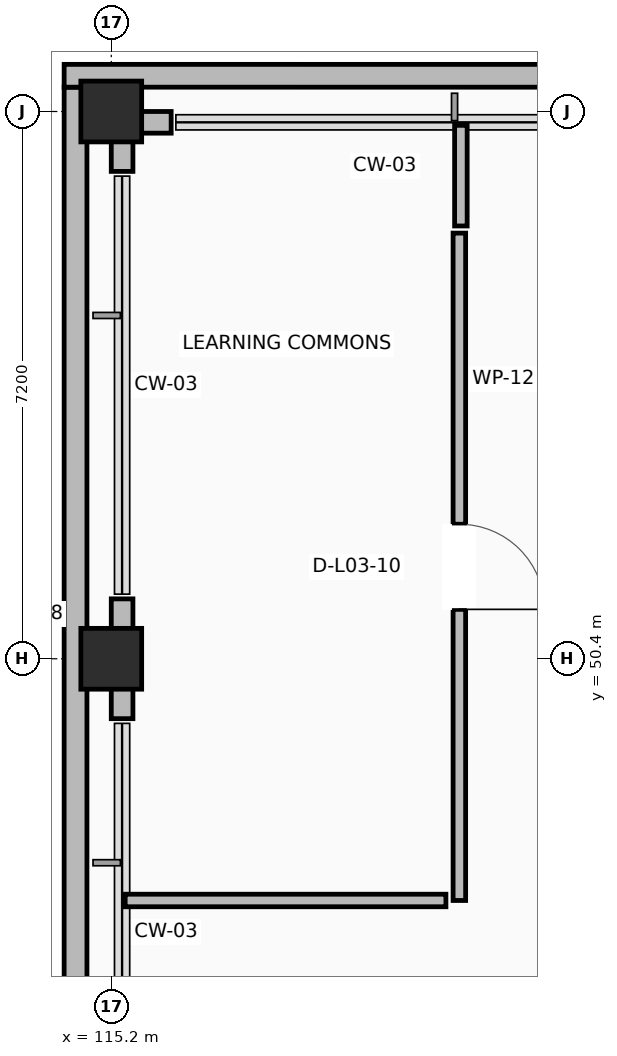
"""IFC4 building model, lengths in metres.
Left out: names, types, materials, properties, quantities, classifications, styles, units other than length and angle.
Written with IfcOpenShell. Run it as: python <this file> out.ifc"""

import sys

from ifc_helpers import new_model, si_unit, direction, frame, frame_2d, origin, origin_2d, place, context, subcontext, project, spatial, rectangle, extrude, element, fill, save


model = new_model("IFC4")
c1 = context("Model", 3, precision=1e-05, world=origin(), true_north=direction((0.0, 1.0)))
c2 = subcontext(c1, "Body", "Model", "MODEL_VIEW")
j1 = project(units=[si_unit("LENGTHUNIT", "METRE"), si_unit("PLANEANGLEUNIT", "RADIAN")], contexts=[c1])
p1 = place(None, origin())
s1 = spatial("IfcSite", under=j1, at=p1, CompositionType="ELEMENT")
p2 = place(p1, origin())
s2 = spatial("IfcBuilding", under=s1, at=p2, CompositionType="ELEMENT")
p3 = place(p2, frame((0.0, 0.0, 13.5)))
s3 = spatial("IfcBuildingStorey", under=s2, at=p3, CompositionType="ELEMENT", Elevation=13.5)
for number, where, z_axis, x_axis in (
    (1, (115.2, 50.4, 0.0), (0.0, 0.0, 1.0), (1.0, 0.0, 0.0)),
    (2, (115.2, 57.6, 0.0), (0.0, 0.0, 1.0), (1.0, 0.0, 0.0)),
):
    element("IfcColumn", number, at=place(p3, frame(where, z_axis=z_axis, x_axis=x_axis)), inside=s3, PredefinedType="COLUMN", context=c2, shape_type="SweptSolid", body=[
        extrude(rectangle(XDim=0.8, YDim=0.8, at=origin_2d()), origin(), (0.0, 0.0, 1.0), 4.22),
    ])
p4 = place(p3, frame((115.988, 57.458, 0.0), z_axis=(0.0, 0.0, 1.0), x_axis=(-1.0, 0.0, 0.0)))
e3 = element("IfcWall", 3, at=p4, inside=s3, PredefinedType="STANDARD", context=c2, shape_type="SweptSolid", body=[
    extrude(rectangle(XDim=0.788, YDim=0.285, at=frame_2d((0.394, 0.0))), origin(), (0.0, 0.0, 1.0), 3.26),
])
p5 = place(p3, frame((115.343, 57.315, 0.0), z_axis=(0.0, 0.0, 1.0), x_axis=(0.0, -1.0, 0.0)))
e4 = element("IfcWall", 4, at=p5, inside=s3, PredefinedType="STANDARD", context=c2, shape_type="SweptSolid", body=[
    extrude(rectangle(XDim=0.503, YDim=0.285, at=frame_2d((0.251, 0.0))), origin(), (0.0, 0.0, 1.0), 3.26),
])
p6 = place(p3, frame((115.343, 51.188, 0.0), z_axis=(0.0, 0.0, 1.0), x_axis=(0.0, -1.0, 0.0)))
e5 = element("IfcWall", 5, at=p6, inside=s3, PredefinedType="STANDARD", context=c2, shape_type="SweptSolid", body=[
    extrude(rectangle(XDim=1.576, YDim=0.285, at=frame_2d((0.788, 0.0))), origin(), (0.0, 0.0, 1.0), 3.26),
])
p7 = place(p3, frame((114.73, 44.07, 0.0), z_axis=(0.0, 0.0, 1.0), x_axis=(0.0, 1.0, 0.0)))
e6 = element("IfcWall", 6, at=p7, inside=s3, PredefinedType="PARAPET", context=c2, shape_type="SweptSolid", body=[
    extrude(rectangle(XDim=13.85, YDim=0.3, at=frame_2d((6.925, 0.0))), origin(), (0.0, 0.0, 1.0), 1.18),
])
p8 = place(p3, frame((114.58, 58.07, 0.0), z_axis=(0.0, 0.0, 1.0), x_axis=(0.999999999738, -2.2875705e-05, 0.0)))
e7 = element("IfcWall", 7, at=p8, inside=s3, PredefinedType="PARAPET", context=c2, shape_type="SweptSolid", body=[
    extrude(rectangle(XDim=42.69, YDim=0.3, at=frame_2d((21.345, 0.0))), origin(), (0.0, 0.0, 1.0), 1.18),
])
p9 = place(p3, frame((119.78, 56.0, 0.0), z_axis=(0.0, 0.0, 1.0), x_axis=(0.0, -1.0, 0.0)))
e8 = element("IfcWall", 8, at=p9, inside=s3, PredefinedType="PARTITIONING", context=c2, shape_type="SweptSolid", body=[
    extrude(rectangle(XDim=8.78, YDim=0.165, at=frame_2d((4.39, 0.0))), origin(), (0.0, 0.0, 1.0), 3.26),
])
p10 = place(p9, frame((3.83, 0.0, 0.0)))
e9 = element("IfcOpeningElement", 9, at=p10, cuts=e8, PredefinedType="OPENING", context=c2, shape_type="SweptSolid", body=[
    extrude(rectangle(XDim=1.12, YDim=2.15, at=frame_2d((0.56, 1.075))), frame((0.0, 0.093, 0.0), z_axis=(0.0, -1.0, 0.0), x_axis=(1.0, 0.0, 0.0)), (0.0, 0.0, 1.0), 0.185),
])
p11 = place(p3, frame((119.603, 47.22, 0.0), z_axis=(0.0, 0.0, 1.0), x_axis=(-1.0, 0.0, 0.0)))
e10 = element("IfcWall", 10, at=p11, inside=s3, PredefinedType="PARTITIONING", context=c2, shape_type="SweptSolid", body=[
    extrude(rectangle(XDim=4.22, YDim=0.165, at=frame_2d((2.11, 0.0))), origin(), (0.0, 0.0, 1.0), 3.26),
])
p12 = place(p3, frame((119.8, 57.418, 0.0), z_axis=(0.0, 0.0, 1.0), x_axis=(0.0, -1.0, 0.0)))
e11 = element("IfcWall", 11, at=p12, inside=s3, PredefinedType="PARTITIONING", context=c2, shape_type="SweptSolid", body=[
    extrude(rectangle(XDim=1.324, YDim=0.165, at=frame_2d((0.662, 0.0))), origin(), (0.0, 0.0, 1.0), 3.26),
])
p13 = place(p10, origin())
e12 = element("IfcDoor", 12, at=p13, inside=s3, OperationType="SINGLE_SWING_RIGHT", PredefinedType="DOOR", context=c2, shape_type="SweptSolid", body=[
    extrude(rectangle(XDim=1.12, YDim=2.15, at=frame_2d((0.56, 1.075))), frame((0.0, 0.025, 0.0), z_axis=(0.0, -1.0, 0.0), x_axis=(1.0, 0.0, 0.0)), (0.0, 0.0, 1.0), 0.05),
])
fill(e9, e12)
save(model, sys.argv[1])
